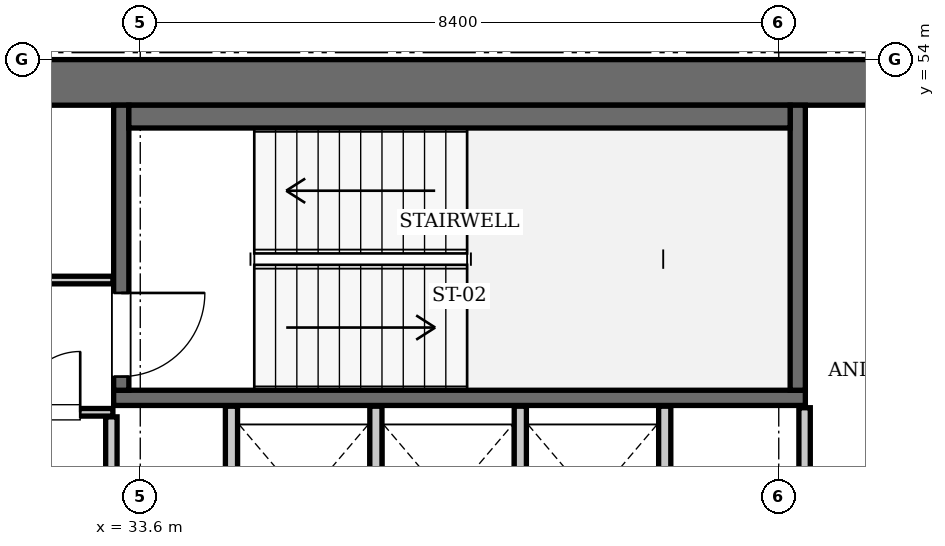
"""IFC4 building model, lengths in metres.
Left out: names, types, materials, properties, quantities, classifications, styles, units other than length and angle.
Written with IfcOpenShell. Run it as: python <this file> out.ifc"""

import sys

from ifc_helpers import new_model, si_unit, direction, frame, frame_2d, origin, place, context, subcontext, project, spatial, rectangle, extrude, element, fill, save


model = new_model("IFC4")
c1 = context("Model", 3, precision=1e-05, world=origin(), true_north=direction((0.0, 1.0)))
c2 = subcontext(c1, "Body", "Model", "MODEL_VIEW")
j1 = project(units=[si_unit("LENGTHUNIT", "METRE"), si_unit("PLANEANGLEUNIT", "RADIAN")], contexts=[c1])
p1 = place(None, origin())
s1 = spatial("IfcSite", under=j1, at=p1, CompositionType="ELEMENT")
p2 = place(p1, origin())
s2 = spatial("IfcBuilding", under=s1, at=p2, CompositionType="ELEMENT")
p3 = place(p2, frame((0.0, 0.0, 247.1)))
s3 = spatial("IfcBuildingStorey", under=s2, at=p3, CompositionType="ELEMENT", Elevation=247.1)
p4 = place(p3, frame((25.2, 53.7, 0.0), z_axis=(0.0, 0.0, 1.0), x_axis=(1.0, 0.0, 0.0)))
e1 = element("IfcWall", 1, at=p4, inside=s3, PredefinedType="SHEAR", context=c2, shape_type="SweptSolid", body=[
    extrude(rectangle(XDim=25.2, YDim=0.6, at=frame_2d((12.6, 0.0))), origin(), (0.0, 0.0, 1.0), 3.85),
])
p5 = place(p3, frame((33.25, 49.55, 0.0), z_axis=(0.0, 0.0, 1.0), x_axis=(1.0, 0.0, 0.0)))
e2 = element("IfcWall", 2, at=p5, inside=s3, PredefinedType="SOLIDWALL", context=c2, shape_type="SweptSolid", body=[
    extrude(rectangle(XDim=9.1, YDim=0.2, at=frame_2d((4.55, 0.0))), origin(), (0.0, 0.0, 1.0), 3.61),
])
p6 = place(p3, frame((42.25, 49.65, 0.0), z_axis=(0.0, 0.0, 1.0), x_axis=(0.0, 1.0, 0.0)))
e3 = element("IfcWall", 3, at=p6, inside=s3, PredefinedType="SOLIDWALL", context=c2, shape_type="SweptSolid", body=[
    extrude(rectangle(XDim=3.75, YDim=0.2, at=frame_2d((1.875, 0.0))), origin(), (0.0, 0.0, 1.0), 3.61),
])
p7 = place(p3, frame((33.35, 49.65, 0.0), z_axis=(0.0, 0.0, 1.0), x_axis=(0.0, 1.0, 0.0)))
e4 = element("IfcWall", 4, at=p7, inside=s3, PredefinedType="SOLIDWALL", context=c2, shape_type="SweptSolid", body=[
    extrude(rectangle(XDim=3.75, YDim=0.2, at=frame_2d((1.875, 0.0))), origin(), (0.0, 0.0, 1.0), 3.61),
])
p8 = place(p7, frame((0.18, 0.0, 0.0)))
e5 = element("IfcOpeningElement", 5, at=p8, cuts=e4, PredefinedType="OPENING", context=c2, shape_type="SweptSolid", body=[
    extrude(rectangle(XDim=1.1, YDim=2.15, at=frame_2d((0.55, 1.075))), frame((0.0, 0.11, 0.0), z_axis=(0.0, -1.0, 0.0), x_axis=(1.0, 0.0, 0.0)), (0.0, 0.0, 1.0), 0.22),
])
p9 = place(p3, frame((33.45, 53.25, 0.0), z_axis=(0.0, 0.0, 1.0), x_axis=(1.0, 0.0, 0.0)))
e6 = element("IfcWall", 6, at=p9, inside=s3, PredefinedType="SOLIDWALL", context=c2, shape_type="SweptSolid", body=[
    extrude(rectangle(XDim=8.7, YDim=0.3, at=frame_2d((4.35, 0.0))), origin(), (0.0, 0.0, 1.0), 3.61),
])
for number, where, z_axis, x_axis in (
    (7, (34.8, 47.25, 0.0), (0.0, 0.0, 1.0), (0.0, 1.0, 0.0)),
    (8, (36.7, 47.25, 0.0), (0.0, 0.0, 1.0), (0.0, 1.0, 0.0)),
    (9, (38.6, 47.25, 0.0), (0.0, 0.0, 1.0), (0.0, 1.0, 0.0)),
    (10, (40.5, 47.25, 0.0), (0.0, 0.0, 1.0), (0.0, 1.0, 0.0)),
):
    element("IfcWall", number, at=place(p3, frame(where, z_axis=z_axis, x_axis=x_axis)), inside=s3, PredefinedType="SOLIDWALL", context=c2, shape_type="SweptSolid", body=[
        extrude(rectangle(XDim=2.19, YDim=0.16, at=frame_2d((1.095, 0.0))), origin(), (0.0, 0.0, 1.0), 3.61),
    ])
p10 = place(p3, frame((33.22, 45.14, 0.0), z_axis=(0.0, 0.0, 1.0), x_axis=(0.0, 1.0, 0.0)))
e11 = element("IfcWall", 11, at=p10, inside=s3, PredefinedType="PARTITIONING", context=c2, shape_type="SweptSolid", body=[
    extrude(rectangle(XDim=4.16, YDim=0.15, at=frame_2d((2.08, 0.0))), origin(), (0.0, 0.0, 1.0), 3.61),
])
p11 = place(p3, frame((30.06, 49.36, 0.0), z_axis=(0.0, 0.0, 1.0), x_axis=(1.0, 0.0, 0.0)))
e12 = element("IfcWall", 12, at=p11, inside=s3, PredefinedType="PARTITIONING", context=c2, shape_type="SweptSolid", body=[
    extrude(rectangle(XDim=3.18, YDim=0.1, at=frame_2d((1.59, 0.0))), origin(), (0.0, 0.0, 1.0), 3.61),
])
p12 = place(p11, frame((1.95, 0.0, 0.0)))
e13 = element("IfcOpeningElement", 13, at=p12, cuts=e12, PredefinedType="OPENING", context=c2, shape_type="SweptSolid", body=[
    extrude(rectangle(XDim=0.8, YDim=2.05, at=frame_2d((0.4, 1.025))), frame((0.0, 0.06, 0.0), z_axis=(0.0, -1.0, 0.0), x_axis=(1.0, 0.0, 0.0)), (0.0, 0.0, 1.0), 0.12),
])
p13 = place(p3, frame((31.82, 51.1, 0.0), z_axis=(0.0, 0.0, 1.0), x_axis=(1.0, 0.0, 0.0)))
e14 = element("IfcWall", 14, at=p13, inside=s3, PredefinedType="PARTITIONING", context=c2, shape_type="SweptSolid", body=[
    extrude(rectangle(XDim=1.42, YDim=0.1, at=frame_2d((0.71, 0.0))), origin(), (0.0, 0.0, 1.0), 3.61),
])
p14 = place(p3, frame((42.34, 47.36, 0.0), z_axis=(0.0, 0.0, 1.0), x_axis=(0.0, 1.0, 0.0)))
e15 = element("IfcWall", 15, at=p14, inside=s3, PredefinedType="PARTITIONING", context=c2, shape_type="SweptSolid", body=[
    extrude(rectangle(XDim=2.06, YDim=0.15, at=frame_2d((1.03, 0.0))), origin(), (0.0, 0.0, 1.0), 3.61),
])
p15 = place(p14, frame((0.24, 0.0, 0.0)))
e16 = element("IfcOpeningElement", 16, at=p15, cuts=e15, PredefinedType="OPENING", context=c2, shape_type="SweptSolid", body=[
    extrude(rectangle(XDim=0.8, YDim=2.05, at=frame_2d((0.4, 1.025))), frame((0.0, 0.085, 0.0), z_axis=(0.0, -1.0, 0.0), x_axis=(1.0, 0.0, 0.0)), (0.0, 0.0, 1.0), 0.17),
])
p16 = place(p8, frame((1.1, 0.0, 0.0), z_axis=(0.0, 0.0, 1.0), x_axis=(-1.0, 0.0, 0.0)))
e17 = element("IfcDoor", 17, at=p16, inside=s3, OperationType="SINGLE_SWING_LEFT", PredefinedType="DOOR", context=c2, shape_type="SweptSolid", body=[
    extrude(rectangle(XDim=1.1, YDim=2.15, at=frame_2d((0.55, 1.075))), frame((0.0, 0.025, 0.0), z_axis=(0.0, -1.0, 0.0), x_axis=(1.0, 0.0, 0.0)), (0.0, 0.0, 1.0), 0.05),
])
fill(e5, e17)
p17 = place(p12, origin())
e18 = element("IfcDoor", 18, at=p17, inside=s3, OperationType="SINGLE_SWING_RIGHT", PredefinedType="DOOR", context=c2, shape_type="SweptSolid", body=[
    extrude(rectangle(XDim=0.8, YDim=2.05, at=frame_2d((0.4, 1.025))), frame((0.0, 0.025, 0.0), z_axis=(0.0, -1.0, 0.0), x_axis=(1.0, 0.0, 0.0)), (0.0, 0.0, 1.0), 0.05),
])
fill(e13, e18)
save(model, sys.argv[1])
